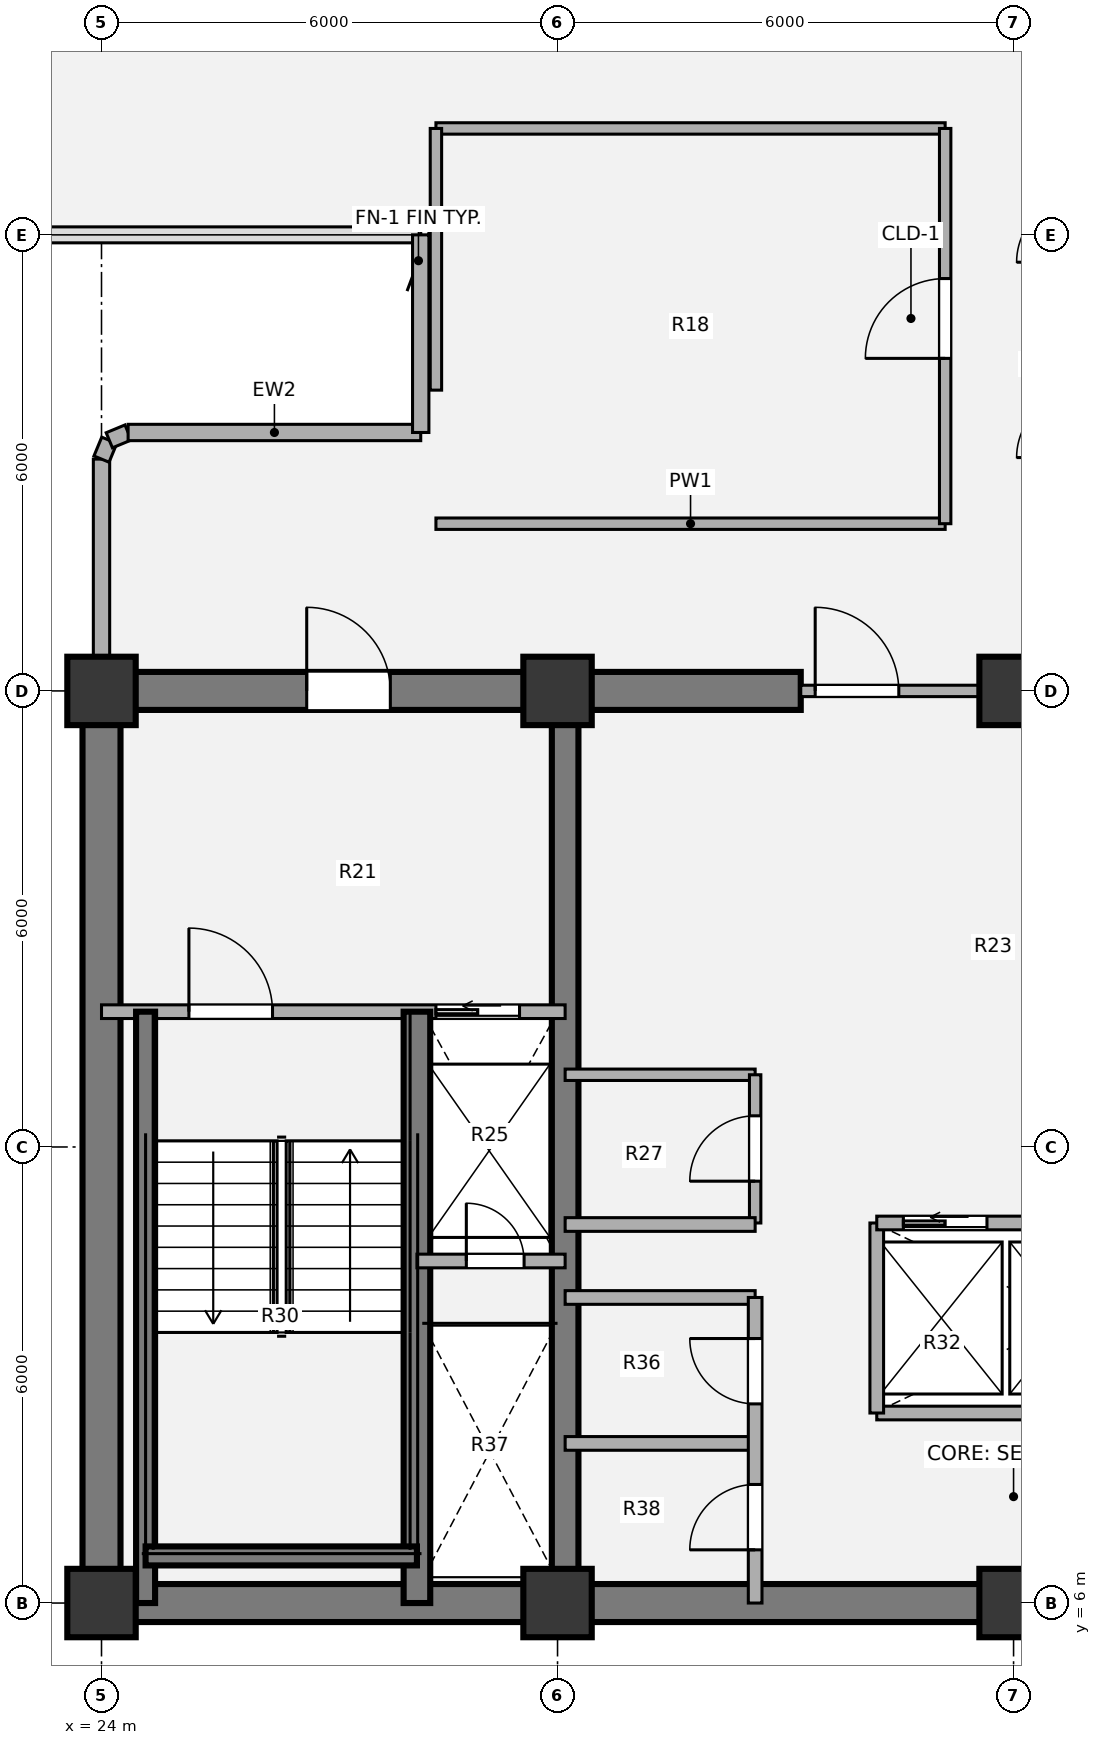
"""IFC4 building model, lengths in metres.
Left out: names, types, materials, properties, quantities, classifications, styles, units other than length and angle.
Written with IfcOpenShell. Run it as: python <this file> out.ifc"""

import sys

from ifc_helpers import new_model, si_unit, direction, frame, frame_2d, origin, origin_2d, place, context, subcontext, project, spatial, rectangle, extrude, source, transform, mapped, element, fill, save


model = new_model("IFC4")
c1 = context("Model", 3, precision=1e-05, world=origin(), true_north=direction((0.0, 1.0)))
c2 = subcontext(c1, "Body", "Model", "MODEL_VIEW")
j1 = project(units=[si_unit("LENGTHUNIT", "METRE"), si_unit("PLANEANGLEUNIT", "RADIAN")], contexts=[c1])
p1 = place(None, origin())
s1 = spatial("IfcSite", under=j1, at=p1, CompositionType="ELEMENT")
p2 = place(p1, origin())
s2 = spatial("IfcBuilding", under=s1, at=p2, CompositionType="ELEMENT")
p3 = place(p2, frame((0.0, 0.0, 138.96)))
s3 = spatial("IfcBuildingStorey", under=s2, at=p3, CompositionType="ELEMENT", Elevation=138.96)
m1 = source(origin(), c2, "Body", "SweptSolid", [
    extrude(rectangle(XDim=0.9, YDim=0.9, at=origin_2d()), origin(), (0.0, 0.0, 1.0), 3.78),
])
for number, where, z_axis, x_axis in (
    (1, (24.0, 6.0, 0.0), (0.0, 0.0, 1.0), (1.0, 0.0, 0.0)),
    (2, (30.0, 6.0, 0.0), (0.0, 0.0, 1.0), (1.0, 0.0, 0.0)),
    (3, (36.0, 6.0, 0.0), (0.0, 0.0, 1.0), (1.0, 0.0, 0.0)),
    (4, (24.0, 18.0, 0.0), (0.0, 0.0, 1.0), (1.0, 0.0, 0.0)),
    (5, (30.0, 18.0, 0.0), (0.0, 0.0, 1.0), (1.0, 0.0, 0.0)),
    (6, (36.0, 18.0, 0.0), (0.0, 0.0, 1.0), (1.0, 0.0, 0.0)),
):
    element("IfcColumn", number, at=place(p3, frame(where, z_axis=z_axis, x_axis=x_axis)), inside=s3, PredefinedType="COLUMN", context=c2, shape_type="MappedRepresentation", body=[
        mapped(m1, transform((0.0, 0.0, 0.0), x_axis=(1.0, 0.0, 0.0), y_axis=(0.0, 1.0, 0.0), z_axis=(0.0, 0.0, 1.0), scale=1.0)),
    ])
p4 = place(p3, frame((48.25, 6.0, 0.0), z_axis=(0.0, 0.0, 1.0), x_axis=(-1.0, 0.0, 0.0)))
e7 = element("IfcWall", 7, at=p4, inside=s3, PredefinedType="SHEAR", context=c2, shape_type="SweptSolid", body=[
    extrude(rectangle(XDim=24.5, YDim=0.5, at=frame_2d((12.25, 0.0))), origin(), (0.0, 0.0, 1.0), 3.78),
])
p5 = place(p3, frame((24.0, 6.0, 0.0), z_axis=(0.0, 0.0, 1.0), x_axis=(0.0, 1.0, 0.0)))
e8 = element("IfcWall", 8, at=p5, inside=s3, PredefinedType="SHEAR", context=c2, shape_type="SweptSolid", body=[
    extrude(rectangle(XDim=12.0, YDim=0.5, at=frame_2d((6.0, 0.0))), origin(), (0.0, 0.0, 1.0), 3.78),
])
p6 = place(p3, frame((23.75, 18.0, 0.0), z_axis=(0.0, 0.0, 1.0), x_axis=(1.0, 0.0, 0.0)))
e9 = element("IfcWall", 9, at=p6, inside=s3, PredefinedType="SHEAR", context=c2, shape_type="SweptSolid", body=[
    extrude(rectangle(XDim=9.45, YDim=0.5, at=frame_2d((4.725, 0.0))), origin(), (0.0, 0.0, 1.0), 3.78),
])
p7 = place(p6, frame((2.95, 0.0, 0.0)))
e10 = element("IfcOpeningElement", 10, at=p7, cuts=e9, PredefinedType="OPENING", context=c2, shape_type="SweptSolid", body=[
    extrude(rectangle(XDim=1.1, YDim=2.1, at=origin_2d()), frame((0.55, 0.26, 1.05), z_axis=(0.0, -1.0, 0.0), x_axis=(1.0, 0.0, 0.0)), (0.0, 0.0, 1.0), 0.52),
])
p8 = place(p3, frame((30.1, 6.0, 0.0), z_axis=(0.0, 0.0, 1.0), x_axis=(0.0, 1.0, 0.0)))
e11 = element("IfcWall", 11, at=p8, inside=s3, PredefinedType="SHEAR", context=c2, shape_type="SweptSolid", body=[
    extrude(rectangle(XDim=12.0, YDim=0.35, at=frame_2d((6.0, 0.0))), origin(), (0.0, 0.0, 1.0), 3.78),
])
p9 = place(p3, frame((24.0, 18.43, 0.0), z_axis=(0.0, 0.0, 1.0), x_axis=(0.0, 1.0, 0.0)))
e12 = element("IfcWall", 12, at=p9, inside=s3, PredefinedType="SOLIDWALL", context=c2, shape_type="SweptSolid", body=[
    extrude(rectangle(XDim=2.62, YDim=0.215, at=frame_2d((1.31, 0.0))), origin(), (0.0, 0.0, 1.0), 3.53),
])
p10 = place(p3, frame((24.0, 21.05, 0.0), z_axis=(0.0, 0.0, 1.0), x_axis=(0.382673670509, 0.923883575944, 0.0)))
e13 = element("IfcWall", 13, at=p10, inside=s3, PredefinedType="SOLIDWALL", context=c2, shape_type="SweptSolid", body=[
    extrude(rectangle(XDim=0.268, YDim=0.215, at=frame_2d((0.134, 0.0))), origin(), (0.0, 0.0, 1.0), 3.53),
])
p11 = place(p3, frame((24.103, 21.298, 0.0), z_axis=(0.0, 0.0, 1.0), x_axis=(0.924205486139, 0.381895560841, 0.0)))
e14 = element("IfcWall", 14, at=p11, inside=s3, PredefinedType="SOLIDWALL", context=c2, shape_type="SweptSolid", body=[
    extrude(rectangle(XDim=0.268, YDim=0.215, at=frame_2d((0.134, 0.0))), origin(), (0.0, 0.0, 1.0), 3.53),
])
p12 = place(p3, frame((24.35, 21.4, 0.0), z_axis=(0.0, 0.0, 1.0), x_axis=(1.0, 0.0, 0.0)))
e15 = element("IfcWall", 15, at=p12, inside=s3, PredefinedType="SOLIDWALL", context=c2, shape_type="SweptSolid", body=[
    extrude(rectangle(XDim=3.85, YDim=0.215, at=frame_2d((1.925, 0.0))), origin(), (0.0, 0.0, 1.0), 3.53),
])
p13 = place(p3, frame((28.2, 21.4, 0.0), z_axis=(0.0, 0.0, 1.0), x_axis=(0.0, 1.0, 0.0)))
e16 = element("IfcWall", 16, at=p13, inside=s3, PredefinedType="SOLIDWALL", context=c2, shape_type="SweptSolid", body=[
    extrude(rectangle(XDim=2.6, YDim=0.215, at=frame_2d((1.3, 0.0))), origin(), (0.0, 0.0, 1.0), 3.53),
])
p14 = place(p3, frame((30.1, 12.95, 0.0), z_axis=(0.0, 0.0, 1.0), x_axis=(1.0, 0.0, 0.0)))
e17 = element("IfcWall", 17, at=p14, inside=s3, PredefinedType="PARTITIONING", context=c2, shape_type="SweptSolid", body=[
    extrude(rectangle(XDim=2.5, YDim=0.15, at=frame_2d((1.25, 0.0))), origin(), (0.0, 0.0, 1.0), 3.5),
])
p15 = place(p3, frame((32.6, 11.0, 0.0), z_axis=(0.0, 0.0, 1.0), x_axis=(0.0, 1.0, 0.0)))
e18 = element("IfcWall", 18, at=p15, inside=s3, PredefinedType="PARTITIONING", context=c2, shape_type="SweptSolid", body=[
    extrude(rectangle(XDim=1.95, YDim=0.15, at=frame_2d((0.975, 0.0))), origin(), (0.0, 0.0, 1.0), 3.5),
])
p16 = place(p15, frame((0.55, 0.0, 0.0)))
e19 = element("IfcOpeningElement", 19, at=p16, cuts=e18, PredefinedType="OPENING", context=c2, shape_type="SweptSolid", body=[
    extrude(rectangle(XDim=0.86, YDim=2.1, at=origin_2d()), frame((0.43, 0.085, 1.05), z_axis=(0.0, -1.0, 0.0), x_axis=(1.0, 0.0, 0.0)), (0.0, 0.0, 1.0), 0.17),
])
p17 = place(p3, frame((34.2, 8.5, 0.0), z_axis=(0.0, 0.0, 1.0), x_axis=(1.0, 0.0, 0.0)))
e20 = element("IfcWall", 20, at=p17, inside=s3, PredefinedType="PARTITIONING", context=c2, shape_type="SweptSolid", body=[
    extrude(rectangle(XDim=5.15, YDim=0.18, at=frame_2d((2.575, 0.0))), origin(), (0.0, 0.0, 1.0), 3.5),
])
for number, where, z_axis, x_axis in (
    (21, (34.2, 8.5, 0.0), (0.0, 0.0, 1.0), (0.0, 1.0, 0.0)),
    (22, (30.1, 10.98, 0.0), (0.0, 0.0, 1.0), (1.0, 0.0, 0.0)),
    (23, (30.1, 8.1, 0.0), (0.0, 0.0, 1.0), (1.0, 0.0, 0.0)),
    (24, (30.1, 10.02, 0.0), (0.0, 0.0, 1.0), (1.0, 0.0, 0.0)),
):
    element("IfcWall", number, at=place(p3, frame(where, z_axis=z_axis, x_axis=x_axis)), inside=s3, PredefinedType="PARTITIONING", context=c2, shape_type="SweptSolid", body=[
        extrude(rectangle(XDim=2.5, YDim=0.18, at=frame_2d((1.25, 0.0))), origin(), (0.0, 0.0, 1.0), 3.5),
    ])
p18 = place(p3, frame((32.6, 6.0, 0.0), z_axis=(0.0, 0.0, 1.0), x_axis=(0.0, 1.0, 0.0)))
e25 = element("IfcWall", 25, at=p18, inside=s3, PredefinedType="PARTITIONING", context=c2, shape_type="SweptSolid", body=[
    extrude(rectangle(XDim=4.02, YDim=0.18, at=frame_2d((2.01, 0.0))), origin(), (0.0, 0.0, 1.0), 3.5),
])
p19 = place(p18, frame((0.7, 0.0, 0.0)))
e26 = element("IfcOpeningElement", 26, at=p19, cuts=e25, PredefinedType="OPENING", context=c2, shape_type="SweptSolid", body=[
    extrude(rectangle(XDim=0.86, YDim=2.1, at=origin_2d()), frame((0.43, 0.1, 1.05), z_axis=(0.0, -1.0, 0.0), x_axis=(1.0, 0.0, 0.0)), (0.0, 0.0, 1.0), 0.2),
])
p20 = place(p18, frame((2.62, 0.0, 0.0)))
e27 = element("IfcOpeningElement", 27, at=p20, cuts=e25, PredefinedType="OPENING", context=c2, shape_type="SweptSolid", body=[
    extrude(rectangle(XDim=0.86, YDim=2.1, at=origin_2d()), frame((0.43, 0.1, 1.05), z_axis=(0.0, -1.0, 0.0), x_axis=(1.0, 0.0, 0.0)), (0.0, 0.0, 1.0), 0.2),
])
p21 = place(p3, frame((33.2, 18.0, 0.0), z_axis=(0.0, 0.0, 1.0), x_axis=(1.0, 0.0, 0.0)))
e28 = element("IfcWall", 28, at=p21, inside=s3, PredefinedType="PARTITIONING", context=c2, shape_type="SweptSolid", body=[
    extrude(rectangle(XDim=5.6, YDim=0.15, at=frame_2d((2.8, 0.0))), origin(), (0.0, 0.0, 1.0), 2.315),
])
p22 = place(p21, frame((0.19, 0.0, 0.0)))
e29 = element("IfcOpeningElement", 29, at=p22, cuts=e28, PredefinedType="OPENING", context=c2, shape_type="SweptSolid", body=[
    extrude(rectangle(XDim=1.1, YDim=2.1, at=origin_2d()), frame((0.55, 0.085, 1.05), z_axis=(0.0, -1.0, 0.0), x_axis=(1.0, 0.0, 0.0)), (0.0, 0.0, 1.0), 0.17),
])
p23 = place(p21, frame((4.31, 0.0, 0.0)))
e30 = element("IfcOpeningElement", 30, at=p23, cuts=e28, PredefinedType="OPENING", context=c2, shape_type="SweptSolid", body=[
    extrude(rectangle(XDim=1.1, YDim=2.1, at=origin_2d()), frame((0.55, 0.085, 1.05), z_axis=(0.0, -1.0, 0.0), x_axis=(1.0, 0.0, 0.0)), (0.0, 0.0, 1.0), 0.17),
])
p24 = place(p3, frame((24.0, 13.78, 0.0), z_axis=(0.0, 0.0, 1.0), x_axis=(1.0, 0.0, 0.0)))
e31 = element("IfcWall", 31, at=p24, inside=s3, PredefinedType="PARTITIONING", context=c2, shape_type="SweptSolid", body=[
    extrude(rectangle(XDim=6.1, YDim=0.18, at=frame_2d((3.05, 0.0))), origin(), (0.0, 0.0, 1.0), 3.5),
])
p25 = place(p24, frame((1.15, 0.0, 0.0)))
e32 = element("IfcOpeningElement", 32, at=p25, cuts=e31, PredefinedType="OPENING", context=c2, shape_type="SweptSolid", body=[
    extrude(rectangle(XDim=1.1, YDim=2.1, at=origin_2d()), frame((0.55, 0.1, 1.05), z_axis=(0.0, -1.0, 0.0), x_axis=(1.0, 0.0, 0.0)), (0.0, 0.0, 1.0), 0.2),
])
p26 = place(p24, frame((4.4, 0.0, 0.0)))
e33 = element("IfcOpeningElement", 33, at=p26, cuts=e31, PredefinedType="OPENING", context=c2, shape_type="SweptSolid", body=[
    extrude(rectangle(XDim=1.1, YDim=2.1, at=origin_2d()), frame((0.55, 0.1, 1.05), z_axis=(0.0, -1.0, 0.0), x_axis=(1.0, 0.0, 0.0)), (0.0, 0.0, 1.0), 0.2),
])
p27 = place(p3, frame((28.15, 6.0, 0.0), z_axis=(0.0, 0.0, 1.0), x_axis=(0.0, 1.0, 0.0)))
e34 = element("IfcWall", 34, at=p27, inside=s3, PredefinedType="SHEAR", context=c2, shape_type="SweptSolid", body=[
    extrude(rectangle(XDim=7.78, YDim=0.35, at=frame_2d((3.89, 0.0))), origin(), (0.0, 0.0, 1.0), 3.85),
])
p28 = place(p3, frame((24.58, 6.0, 0.0), z_axis=(0.0, 0.0, 1.0), x_axis=(0.0, 1.0, 0.0)))
e35 = element("IfcWall", 35, at=p28, inside=s3, PredefinedType="SHEAR", context=c2, shape_type="SweptSolid", body=[
    extrude(rectangle(XDim=7.78, YDim=0.25, at=frame_2d((3.89, 0.0))), origin(), (0.0, 0.0, 1.0), 3.85),
])
p29 = place(p3, frame((24.58, 6.62, 0.0), z_axis=(0.0, 0.0, 1.0), x_axis=(1.0, 0.0, 0.0)))
e36 = element("IfcWall", 36, at=p29, inside=s3, PredefinedType="SHEAR", context=c2, shape_type="SweptSolid", body=[
    extrude(rectangle(XDim=3.57, YDim=0.25, at=frame_2d((1.785, 0.0))), origin(), (0.0, 0.0, 1.0), 3.85),
])
p30 = place(p3, frame((28.15, 10.5, 0.0), z_axis=(0.0, 0.0, 1.0), x_axis=(1.0, 0.0, 0.0)))
e37 = element("IfcWall", 37, at=p30, inside=s3, PredefinedType="PARTITIONING", context=c2, shape_type="SweptSolid", body=[
    extrude(rectangle(XDim=1.95, YDim=0.18, at=frame_2d((0.975, 0.0))), origin(), (0.0, 0.0, 1.0), 3.5),
])
p31 = place(p30, frame((0.65, 0.0, 0.0)))
e38 = element("IfcOpeningElement", 38, at=p31, cuts=e37, PredefinedType="OPENING", context=c2, shape_type="SweptSolid", body=[
    extrude(rectangle(XDim=0.76, YDim=2.05, at=origin_2d()), frame((0.38, 0.1, 1.025), z_axis=(0.0, -1.0, 0.0), x_axis=(1.0, 0.0, 0.0)), (0.0, 0.0, 1.0), 0.2),
])
p32 = place(p3, frame((34.2, 11.0, 0.0), z_axis=(0.0, 0.0, 1.0), x_axis=(1.0, 0.0, 0.0)))
e39 = element("IfcWall", 39, at=p32, inside=s3, PredefinedType="PARTITIONING", context=c2, shape_type="SweptSolid", body=[
    extrude(rectangle(XDim=5.15, YDim=0.18, at=frame_2d((2.575, 0.0))), origin(), (0.0, 0.0, 1.0), 3.5),
])
p33 = place(p32, frame((0.35, 0.0, 0.0)))
e40 = element("IfcOpeningElement", 40, at=p33, cuts=e39, PredefinedType="OPENING", context=c2, shape_type="SweptSolid", body=[
    extrude(rectangle(XDim=1.1, YDim=2.1, at=origin_2d()), frame((0.55, 0.1, 1.05), z_axis=(0.0, -1.0, 0.0), x_axis=(1.0, 0.0, 0.0)), (0.0, 0.0, 1.0), 0.2),
])
p34 = place(p32, frame((2.05, 0.0, 0.0)))
e41 = element("IfcOpeningElement", 41, at=p34, cuts=e39, PredefinedType="OPENING", context=c2, shape_type="SweptSolid", body=[
    extrude(rectangle(XDim=1.1, YDim=2.1, at=origin_2d()), frame((0.55, 0.1, 1.05), z_axis=(0.0, -1.0, 0.0), x_axis=(1.0, 0.0, 0.0)), (0.0, 0.0, 1.0), 0.2),
])
p35 = place(p32, frame((3.7, 0.0, 0.0)))
e42 = element("IfcOpeningElement", 42, at=p35, cuts=e39, PredefinedType="OPENING", context=c2, shape_type="SweptSolid", body=[
    extrude(rectangle(XDim=1.1, YDim=2.1, at=origin_2d()), frame((0.55, 0.1, 1.05), z_axis=(0.0, -1.0, 0.0), x_axis=(1.0, 0.0, 0.0)), (0.0, 0.0, 1.0), 0.2),
])
for number, where, z_axis, x_axis in (
    (43, (28.4, 20.2, 0.0), (0.0, 0.0, 1.0), (1.0, 0.0, 0.0)),
    (44, (28.4, 25.4, 0.0), (0.0, 0.0, 1.0), (1.0, 0.0, 0.0)),
):
    element("IfcWall", number, at=place(p3, frame(where, z_axis=z_axis, x_axis=x_axis)), inside=s3, PredefinedType="PARTITIONING", context=c2, shape_type="SweptSolid", body=[
        extrude(rectangle(XDim=6.7, YDim=0.15, at=frame_2d((3.35, 0.0))), origin(), (0.0, 0.0, 1.0), 3.5),
    ])
p36 = place(p3, frame((28.4, 21.957, 0.0), z_axis=(0.0, 0.0, 1.0), x_axis=(0.0, 1.0, 0.0)))
e45 = element("IfcWall", 45, at=p36, inside=s3, PredefinedType="PARTITIONING", context=c2, shape_type="SweptSolid", body=[
    extrude(rectangle(XDim=3.443, YDim=0.15, at=frame_2d((1.721, 0.0))), origin(), (0.0, 0.0, 1.0), 3.5),
])
p37 = place(p3, frame((35.1, 20.2, 0.0), z_axis=(0.0, 0.0, 1.0), x_axis=(0.0, 1.0, 0.0)))
e46 = element("IfcWall", 46, at=p37, inside=s3, PredefinedType="PARTITIONING", context=c2, shape_type="SweptSolid", body=[
    extrude(rectangle(XDim=5.2, YDim=0.15, at=frame_2d((2.6, 0.0))), origin(), (0.0, 0.0, 1.0), 3.5),
])
p38 = place(p37, frame((2.175, 0.0, 0.0)))
e47 = element("IfcOpeningElement", 47, at=p38, cuts=e46, PredefinedType="OPENING", context=c2, shape_type="SweptSolid", body=[
    extrude(rectangle(XDim=1.05, YDim=2.1, at=origin_2d()), frame((0.525, 0.085, 1.05), z_axis=(0.0, -1.0, 0.0), x_axis=(1.0, 0.0, 0.0)), (0.0, 0.0, 1.0), 0.17),
])
m2 = source(origin(), c2, "Body", "SweptSolid", [
    extrude(rectangle(XDim=0.86, YDim=2.1, at=origin_2d()), frame((0.43, 0.025, 1.05), z_axis=(0.0, -1.0, 0.0), x_axis=(1.0, 0.0, 0.0)), (0.0, 0.0, 1.0), 0.05),
])
p39 = place(p16, origin())
e48 = element("IfcDoor", 48, at=p39, inside=s3, OperationType="SINGLE_SWING_LEFT", PredefinedType="DOOR", context=c2, shape_type="MappedRepresentation", body=[
    mapped(m2, transform((0.0, 0.0, 0.0), x_axis=(1.0, 0.0, 0.0), y_axis=(0.0, 1.0, 0.0), z_axis=(0.0, 0.0, 1.0), scale=1.0)),
])
fill(e19, e48)
p40 = place(p19, origin())
e49 = element("IfcDoor", 49, at=p40, inside=s3, OperationType="SINGLE_SWING_LEFT", PredefinedType="DOOR", context=c2, shape_type="MappedRepresentation", body=[
    mapped(m2, transform((0.0, 0.0, 0.0), x_axis=(1.0, 0.0, 0.0), y_axis=(0.0, 1.0, 0.0), z_axis=(0.0, 0.0, 1.0), scale=1.0)),
])
fill(e26, e49)
p41 = place(p20, origin())
e50 = element("IfcDoor", 50, at=p41, inside=s3, OperationType="SINGLE_SWING_RIGHT", PredefinedType="DOOR", context=c2, shape_type="MappedRepresentation", body=[
    mapped(m2, transform((0.0, 0.0, 0.0), x_axis=(1.0, 0.0, 0.0), y_axis=(0.0, 1.0, 0.0), z_axis=(0.0, 0.0, 1.0), scale=1.0)),
])
fill(e27, e50)
m3 = source(origin(), c2, "Body", "SweptSolid", [
    extrude(rectangle(XDim=1.1, YDim=2.1, at=origin_2d()), frame((0.55, 0.025, 1.05), z_axis=(0.0, -1.0, 0.0), x_axis=(1.0, 0.0, 0.0)), (0.0, 0.0, 1.0), 0.05),
])
p42 = place(p22, origin())
e51 = element("IfcDoor", 51, at=p42, inside=s3, OperationType="SINGLE_SWING_LEFT", PredefinedType="DOOR", context=c2, shape_type="MappedRepresentation", body=[
    mapped(m3, transform((0.0, 0.0, 0.0), x_axis=(1.0, 0.0, 0.0), y_axis=(0.0, 1.0, 0.0), z_axis=(0.0, 0.0, 1.0), scale=1.0)),
])
fill(e29, e51)
m4 = source(origin(), c2, "Body", "SweptSolid", [
    extrude(rectangle(XDim=1.1, YDim=2.1, at=origin_2d()), frame((0.55, 0.025, 1.05), z_axis=(0.0, -1.0, 0.0), x_axis=(1.0, 0.0, 0.0)), (0.0, 0.0, 1.0), 0.05),
])
p43 = place(p25, origin())
e52 = element("IfcDoor", 52, at=p43, inside=s3, OperationType="SINGLE_SWING_LEFT", PredefinedType="DOOR", context=c2, shape_type="MappedRepresentation", body=[
    mapped(m4, transform((0.0, 0.0, 0.0), x_axis=(1.0, 0.0, 0.0), y_axis=(0.0, 1.0, 0.0), z_axis=(0.0, 0.0, 1.0), scale=1.0)),
])
fill(e32, e52)
m5 = source(origin(), c2, "Body", "SweptSolid", [
    extrude(rectangle(XDim=1.1, YDim=2.1, at=origin_2d()), frame((0.55, 0.025, 1.05), z_axis=(0.0, -1.0, 0.0), x_axis=(1.0, 0.0, 0.0)), (0.0, 0.0, 1.0), 0.05),
])
p44 = place(p26, origin())
e53 = element("IfcDoor", 53, at=p44, inside=s3, OperationType="SLIDING_TO_LEFT", PredefinedType="DOOR", context=c2, shape_type="MappedRepresentation", body=[
    mapped(m5, transform((0.0, 0.0, 0.0), x_axis=(1.0, 0.0, 0.0), y_axis=(0.0, 1.0, 0.0), z_axis=(0.0, 0.0, 1.0), scale=1.0)),
])
fill(e33, e53)
m6 = source(origin(), c2, "Body", "SweptSolid", [
    extrude(rectangle(XDim=0.76, YDim=2.05, at=origin_2d()), frame((0.38, 0.025, 1.025), z_axis=(0.0, -1.0, 0.0), x_axis=(1.0, 0.0, 0.0)), (0.0, 0.0, 1.0), 0.05),
])
p45 = place(p31, origin())
e54 = element("IfcDoor", 54, at=p45, inside=s3, OperationType="SINGLE_SWING_LEFT", PredefinedType="DOOR", context=c2, shape_type="MappedRepresentation", body=[
    mapped(m6, transform((0.0, 0.0, 0.0), x_axis=(1.0, 0.0, 0.0), y_axis=(0.0, 1.0, 0.0), z_axis=(0.0, 0.0, 1.0), scale=1.0)),
])
fill(e38, e54)
p46 = place(p7, origin())
e55 = element("IfcDoor", 55, at=p46, inside=s3, OperationType="SINGLE_SWING_LEFT", PredefinedType="DOOR", context=c2, shape_type="MappedRepresentation", body=[
    mapped(m3, transform((0.0, 0.0, 0.0), x_axis=(1.0, 0.0, 0.0), y_axis=(0.0, 1.0, 0.0), z_axis=(0.0, 0.0, 1.0), scale=1.0)),
])
fill(e10, e55)
p47 = place(p33, origin())
e56 = element("IfcDoor", 56, at=p47, inside=s3, OperationType="SLIDING_TO_LEFT", PredefinedType="DOOR", context=c2, shape_type="MappedRepresentation", body=[
    mapped(m5, transform((0.0, 0.0, 0.0), x_axis=(1.0, 0.0, 0.0), y_axis=(0.0, 1.0, 0.0), z_axis=(0.0, 0.0, 1.0), scale=1.0)),
])
fill(e40, e56)
m7 = source(origin(), c2, "Body", "SweptSolid", [
    extrude(rectangle(XDim=1.05, YDim=2.1, at=origin_2d()), frame((0.525, 0.025, 1.05), z_axis=(0.0, -1.0, 0.0), x_axis=(1.0, 0.0, 0.0)), (0.0, 0.0, 1.0), 0.05),
])
p48 = place(p38, origin())
e57 = element("IfcDoor", 57, at=p48, inside=s3, OperationType="SINGLE_SWING_LEFT", PredefinedType="DOOR", context=c2, shape_type="MappedRepresentation", body=[
    mapped(m7, transform((0.0, 0.0, 0.0), x_axis=(1.0, 0.0, 0.0), y_axis=(0.0, 1.0, 0.0), z_axis=(0.0, 0.0, 1.0), scale=1.0)),
])
fill(e47, e57)
save(model, sys.argv[1])
